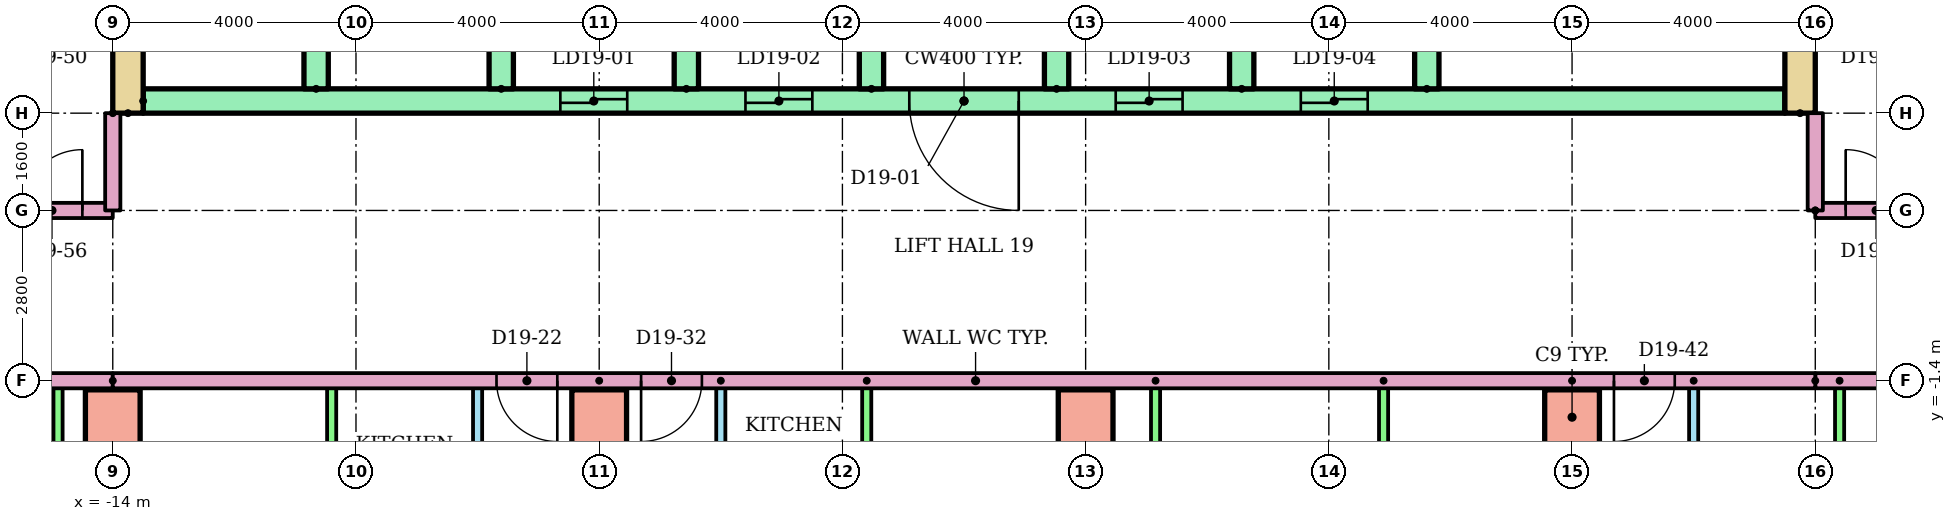
"""IFC4 building model, lengths in metres.
Left out: names, types, materials, properties, quantities, classifications, styles, units other than length and angle.
Written with IfcOpenShell. Run it as: python <this file> out.ifc"""

import sys

from ifc_helpers import new_model, si_unit, direction, frame, frame_2d, origin, origin_2d, place, context, subcontext, project, spatial, rectangle, extrude, element, fill, save


model = new_model("IFC4")
c1 = context("Model", 3, precision=1e-05, world=origin(), true_north=direction((0.0, 1.0)))
c2 = subcontext(c1, "Body", "Model", "MODEL_VIEW")
j1 = project(units=[si_unit("LENGTHUNIT", "METRE"), si_unit("PLANEANGLEUNIT", "RADIAN")], contexts=[c1])
p1 = place(None, origin())
s1 = spatial("IfcSite", under=j1, at=p1, CompositionType="ELEMENT")
p2 = place(p1, origin())
s2 = spatial("IfcBuilding", under=s1, at=p2, CompositionType="ELEMENT")
p3 = place(p2, frame((0.0, 0.0, 77.5)))
s3 = spatial("IfcBuildingStorey", under=s2, at=p3, CompositionType="ELEMENT", Elevation=77.5)
for number, where in (
    (1, (-14.0, -2.0, 0.0)),
    (2, (-6.0, -2.0, 0.0)),
    (3, (2.0, -2.0, 0.0)),
    (4, (10.0, -2.0, 0.0)),
):
    element("IfcColumn", number, at=place(p3, frame(where)), inside=s3, PredefinedType="COLUMN", context=c2, shape_type="SweptSolid", body=[
        extrude(rectangle(XDim=0.9, YDim=0.9, at=origin_2d()), origin(), (0.0, 0.0, 1.0), 3.2),
    ])
for number, where, z_axis, x_axis in (
    (5, (-13.75, 3.0, 0.0), (0.0, 0.0, 1.0), (0.0, 1.0, 0.0)),
    (6, (13.75, 3.0, 0.0), (0.0, 0.0, 1.0), (0.0, 1.0, 0.0)),
):
    element("IfcWall", number, at=place(p3, frame(where, z_axis=z_axis, x_axis=x_axis)), inside=s3, PredefinedType="SHEAR", context=c2, shape_type="SweptSolid", body=[
        extrude(rectangle(XDim=17.0, YDim=0.5, at=frame_2d((8.5, 0.0))), origin(), (0.0, 0.0, 1.0), 2.92),
    ])
p4 = place(p3, frame((-13.5, 3.2, 0.0)))
e7 = element("IfcWall", 7, at=p4, inside=s3, PredefinedType="SHEAR", context=c2, shape_type="SweptSolid", body=[
    extrude(rectangle(XDim=27.0, YDim=0.4, at=frame_2d((13.5, 0.0))), origin(), (0.0, 0.0, 1.0), 2.92),
])
p5 = place(p4, frame((6.861, 0.0, 0.0)))
e8 = element("IfcOpeningElement", 8, at=p5, cuts=e7, PredefinedType="OPENING", context=c2, shape_type="SweptSolid", body=[
    extrude(rectangle(XDim=1.1, YDim=2.1, at=frame_2d((0.55, 1.05))), frame((0.0, 0.21, 0.0), z_axis=(0.0, -1.0, 0.0), x_axis=(1.0, 0.0, 0.0)), (0.0, 0.0, 1.0), 0.42),
])
p6 = place(p4, frame((9.906, 0.0, 0.0)))
e9 = element("IfcOpeningElement", 9, at=p6, cuts=e7, PredefinedType="OPENING", context=c2, shape_type="SweptSolid", body=[
    extrude(rectangle(XDim=1.1, YDim=2.1, at=frame_2d((0.55, 1.05))), frame((0.0, 0.21, 0.0), z_axis=(0.0, -1.0, 0.0), x_axis=(1.0, 0.0, 0.0)), (0.0, 0.0, 1.0), 0.42),
])
p7 = place(p4, frame((15.994, 0.0, 0.0)))
e10 = element("IfcOpeningElement", 10, at=p7, cuts=e7, PredefinedType="OPENING", context=c2, shape_type="SweptSolid", body=[
    extrude(rectangle(XDim=1.1, YDim=2.1, at=frame_2d((0.55, 1.05))), frame((0.0, 0.21, 0.0), z_axis=(0.0, -1.0, 0.0), x_axis=(1.0, 0.0, 0.0)), (0.0, 0.0, 1.0), 0.42),
])
p8 = place(p4, frame((19.039, 0.0, 0.0)))
e11 = element("IfcOpeningElement", 11, at=p8, cuts=e7, PredefinedType="OPENING", context=c2, shape_type="SweptSolid", body=[
    extrude(rectangle(XDim=1.1, YDim=2.1, at=frame_2d((0.55, 1.05))), frame((0.0, 0.21, 0.0), z_axis=(0.0, -1.0, 0.0), x_axis=(1.0, 0.0, 0.0)), (0.0, 0.0, 1.0), 0.42),
])
p9 = place(p4, frame((12.6, 0.0, 0.0)))
e12 = element("IfcOpeningElement", 12, at=p9, cuts=e7, PredefinedType="OPENING", context=c2, shape_type="SweptSolid", body=[
    extrude(rectangle(XDim=1.8, YDim=2.1, at=frame_2d((0.9, 1.05))), frame((0.0, 0.21, 0.0), z_axis=(0.0, -1.0, 0.0), x_axis=(1.0, 0.0, 0.0)), (0.0, 0.0, 1.0), 0.42),
])
for number, where, z_axis, x_axis in (
    (13, (-10.656, 3.4, 0.0), (0.0, 0.0, 1.0), (0.0, 1.0, 0.0)),
    (14, (-7.611, 3.4, 0.0), (0.0, 0.0, 1.0), (0.0, 1.0, 0.0)),
    (15, (-4.567, 3.4, 0.0), (0.0, 0.0, 1.0), (0.0, 1.0, 0.0)),
    (16, (-1.522, 3.4, 0.0), (0.0, 0.0, 1.0), (0.0, 1.0, 0.0)),
    (17, (1.522, 3.4, 0.0), (0.0, 0.0, 1.0), (0.0, 1.0, 0.0)),
    (18, (4.567, 3.4, 0.0), (0.0, 0.0, 1.0), (0.0, 1.0, 0.0)),
    (19, (7.611, 3.4, 0.0), (0.0, 0.0, 1.0), (0.0, 1.0, 0.0)),
):
    element("IfcWall", number, at=place(p3, frame(where, z_axis=z_axis, x_axis=x_axis)), inside=s3, PredefinedType="SHEAR", context=c2, shape_type="SweptSolid", body=[
        extrude(rectangle(XDim=3.0, YDim=0.4, at=frame_2d((1.5, 0.0))), origin(), (0.0, 0.0, 1.0), 2.92),
    ])
p10 = place(p3, frame((-8.0, -7.9, 0.0), z_axis=(0.0, 0.0, 1.0), x_axis=(0.0, 1.0, 0.0)))
e20 = element("IfcWall", 20, at=p10, inside=s3, PredefinedType="PARTITIONING", context=c2, shape_type="SweptSolid", body=[
    extrude(rectangle(XDim=6.5, YDim=0.15, at=frame_2d((3.25, 0.0))), origin(), (0.0, 0.0, 1.0), 2.4),
])
p11 = place(p10, frame((4.3, 0.0, 0.0)))
e21 = element("IfcOpeningElement", 21, at=p11, cuts=e20, PredefinedType="OPENING", context=c2, shape_type="SweptSolid", body=[
    extrude(rectangle(XDim=0.9, YDim=2.1, at=frame_2d((0.45, 1.05))), frame((0.0, 0.085, 0.0), z_axis=(0.0, -1.0, 0.0), x_axis=(1.0, 0.0, 0.0)), (0.0, 0.0, 1.0), 0.17),
])
p12 = place(p10, frame((1.1, 0.0, 0.0)))
e22 = element("IfcOpeningElement", 22, at=p12, cuts=e20, PredefinedType="OPENING", context=c2, shape_type="SweptSolid", body=[
    extrude(rectangle(XDim=0.8, YDim=2.1, at=frame_2d((0.4, 1.05))), frame((0.0, 0.085, 0.0), z_axis=(0.0, -1.0, 0.0), x_axis=(1.0, 0.0, 0.0)), (0.0, 0.0, 1.0), 0.17),
])
for number, where, z_axis, x_axis in (
    (23, (-10.4, -7.9, 0.0), (0.0, 0.0, 1.0), (0.0, 1.0, 0.0)),
    (24, (-14.9, -7.9, 0.0), (0.0, 0.0, 1.0), (0.0, 1.0, 0.0)),
):
    element("IfcWall", number, at=place(p3, frame(where, z_axis=z_axis, x_axis=x_axis)), inside=s3, PredefinedType="PARTITIONING", context=c2, shape_type="SweptSolid", body=[
        extrude(rectangle(XDim=6.5, YDim=0.15, at=frame_2d((3.25, 0.0))), origin(), (0.0, 0.0, 1.0), 2.4),
    ])
p13 = place(p3, frame((-4.0, -1.4, 0.0), z_axis=(0.0, 0.0, 1.0), x_axis=(0.0, -1.0, 0.0)))
e25 = element("IfcWall", 25, at=p13, inside=s3, PredefinedType="PARTITIONING", context=c2, shape_type="SweptSolid", body=[
    extrude(rectangle(XDim=6.5, YDim=0.15, at=frame_2d((3.25, 0.0))), origin(), (0.0, 0.0, 1.0), 2.4),
])
p14 = place(p13, frame((1.3, 0.0, 0.0)))
e26 = element("IfcOpeningElement", 26, at=p14, cuts=e25, PredefinedType="OPENING", context=c2, shape_type="SweptSolid", body=[
    extrude(rectangle(XDim=0.9, YDim=2.1, at=frame_2d((0.45, 1.05))), frame((0.0, 0.085, 0.0), z_axis=(0.0, -1.0, 0.0), x_axis=(1.0, 0.0, 0.0)), (0.0, 0.0, 1.0), 0.17),
])
p15 = place(p13, frame((4.6, 0.0, 0.0)))
e27 = element("IfcOpeningElement", 27, at=p15, cuts=e25, PredefinedType="OPENING", context=c2, shape_type="SweptSolid", body=[
    extrude(rectangle(XDim=0.8, YDim=2.1, at=frame_2d((0.4, 1.05))), frame((0.0, 0.085, 0.0), z_axis=(0.0, -1.0, 0.0), x_axis=(1.0, 0.0, 0.0)), (0.0, 0.0, 1.0), 0.17),
])
for number, where, z_axis, x_axis in (
    (28, (-1.6, -1.4, 0.0), (0.0, 0.0, 1.0), (0.0, -1.0, 0.0)),
    (29, (3.15, -1.4, 0.0), (0.0, 0.0, 1.0), (0.0, -1.0, 0.0)),
    (30, (6.9, -1.4, 0.0), (0.0, 0.0, 1.0), (0.0, -1.0, 0.0)),
):
    element("IfcWall", number, at=place(p3, frame(where, z_axis=z_axis, x_axis=x_axis)), inside=s3, PredefinedType="PARTITIONING", context=c2, shape_type="SweptSolid", body=[
        extrude(rectangle(XDim=6.5, YDim=0.15, at=frame_2d((3.25, 0.0))), origin(), (0.0, 0.0, 1.0), 2.4),
    ])
p16 = place(p3, frame((-6.0, -1.4, 0.0), z_axis=(0.0, 0.0, 1.0), x_axis=(0.0, -1.0, 0.0)))
e31 = element("IfcWall", 31, at=p16, inside=s3, PredefinedType="PARTITIONING", context=c2, shape_type="SweptSolid", body=[
    extrude(rectangle(XDim=14.81, YDim=0.25, at=frame_2d((7.405, 0.0))), origin(), (0.0, 0.0, 1.0), 2.4),
])
p17 = place(p3, frame((12.0, -1.4, 0.0), z_axis=(0.0, 0.0, 1.0), x_axis=(0.0, -1.0, 0.0)))
e32 = element("IfcWall", 32, at=p17, inside=s3, PredefinedType="PARTITIONING", context=c2, shape_type="SweptSolid", body=[
    extrude(rectangle(XDim=6.5, YDim=0.15, at=frame_2d((3.25, 0.0))), origin(), (0.0, 0.0, 1.0), 2.4),
])
p18 = place(p17, frame((1.3, 0.0, 0.0)))
e33 = element("IfcOpeningElement", 33, at=p18, cuts=e32, PredefinedType="OPENING", context=c2, shape_type="SweptSolid", body=[
    extrude(rectangle(XDim=0.9, YDim=2.1, at=frame_2d((0.45, 1.05))), frame((0.0, 0.085, 0.0), z_axis=(0.0, -1.0, 0.0), x_axis=(1.0, 0.0, 0.0)), (0.0, 0.0, 1.0), 0.17),
])
p19 = place(p17, frame((4.6, 0.0, 0.0)))
e34 = element("IfcOpeningElement", 34, at=p19, cuts=e32, PredefinedType="OPENING", context=c2, shape_type="SweptSolid", body=[
    extrude(rectangle(XDim=0.8, YDim=2.1, at=frame_2d((0.4, 1.05))), frame((0.0, 0.085, 0.0), z_axis=(0.0, -1.0, 0.0), x_axis=(1.0, 0.0, 0.0)), (0.0, 0.0, 1.0), 0.17),
])
p20 = place(p3, frame((14.4, -1.4, 0.0), z_axis=(0.0, 0.0, 1.0), x_axis=(0.0, -1.0, 0.0)))
e35 = element("IfcWall", 35, at=p20, inside=s3, PredefinedType="PARTITIONING", context=c2, shape_type="SweptSolid", body=[
    extrude(rectangle(XDim=6.5, YDim=0.15, at=frame_2d((3.25, 0.0))), origin(), (0.0, 0.0, 1.0), 2.4),
])
p21 = place(p3, frame((10.0, -1.4, 0.0), z_axis=(0.0, 0.0, 1.0), x_axis=(0.0, -1.0, 0.0)))
e36 = element("IfcWall", 36, at=p21, inside=s3, PredefinedType="PARTITIONING", context=c2, shape_type="SweptSolid", body=[
    extrude(rectangle(XDim=14.81, YDim=0.25, at=frame_2d((7.405, 0.0))), origin(), (0.0, 0.0, 1.0), 2.4),
])
p22 = place(p3, frame((-14.0, -1.4, 0.0), z_axis=(0.0, 0.0, 1.0), x_axis=(-1.0, 0.0, 0.0)))
e37 = element("IfcWall", 37, at=p22, inside=s3, PredefinedType="PARTITIONING", context=c2, shape_type="SweptSolid", body=[
    extrude(rectangle(XDim=14.62, YDim=0.25, at=frame_2d((7.31, 0.0))), origin(), (0.0, 0.0, 1.0), 2.4),
])
p23 = place(p3, frame((29.0, -1.4, 0.0), z_axis=(0.0, 0.0, 1.0), x_axis=(-1.0, 0.0, 0.0)))
e38 = element("IfcWall", 38, at=p23, inside=s3, PredefinedType="PARTITIONING", context=c2, shape_type="SweptSolid", body=[
    extrude(rectangle(XDim=15.0, YDim=0.25, at=frame_2d((7.5, 0.0))), origin(), (0.0, 0.0, 1.0), 2.4),
])
p24 = place(p23, frame((1.311, 0.0, 0.0)))
e39 = element("IfcOpeningElement", 39, at=p24, cuts=e38, PredefinedType="OPENING", context=c2, shape_type="SweptSolid", body=[
    extrude(rectangle(XDim=1.0, YDim=2.1, at=frame_2d((0.5, 1.05))), frame((0.0, 0.135, 0.0), z_axis=(0.0, -1.0, 0.0), x_axis=(1.0, 0.0, 0.0)), (0.0, 0.0, 1.0), 0.27),
])
p25 = place(p3, frame((-28.62, 1.4, 0.0)))
e40 = element("IfcWall", 40, at=p25, inside=s3, PredefinedType="PARTITIONING", context=c2, shape_type="SweptSolid", body=[
    extrude(rectangle(XDim=14.62, YDim=0.25, at=frame_2d((7.31, 0.0))), origin(), (0.0, 0.0, 1.0), 2.4),
])
p26 = place(p25, frame((13.12, 0.0, 0.0)))
e41 = element("IfcOpeningElement", 41, at=p26, cuts=e40, PredefinedType="OPENING", context=c2, shape_type="SweptSolid", body=[
    extrude(rectangle(XDim=1.0, YDim=2.1, at=frame_2d((0.5, 1.05))), frame((0.0, 0.135, 0.0), z_axis=(0.0, -1.0, 0.0), x_axis=(1.0, 0.0, 0.0)), (0.0, 0.0, 1.0), 0.27),
])
p27 = place(p3, frame((14.0, 1.4, 0.0)))
e42 = element("IfcWall", 42, at=p27, inside=s3, PredefinedType="PARTITIONING", context=c2, shape_type="SweptSolid", body=[
    extrude(rectangle(XDim=15.0, YDim=0.25, at=frame_2d((7.5, 0.0))), origin(), (0.0, 0.0, 1.0), 2.4),
])
p28 = place(p27, frame((0.5, 0.0, 0.0)))
e43 = element("IfcOpeningElement", 43, at=p28, cuts=e42, PredefinedType="OPENING", context=c2, shape_type="SweptSolid", body=[
    extrude(rectangle(XDim=1.0, YDim=2.1, at=frame_2d((0.5, 1.05))), frame((0.0, 0.135, 0.0), z_axis=(0.0, -1.0, 0.0), x_axis=(1.0, 0.0, 0.0)), (0.0, 0.0, 1.0), 0.27),
])
p29 = place(p27, frame((12.689, 0.0, 0.0)))
e44 = element("IfcOpeningElement", 44, at=p29, cuts=e42, PredefinedType="OPENING", context=c2, shape_type="SweptSolid", body=[
    extrude(rectangle(XDim=1.0, YDim=2.1, at=frame_2d((0.5, 1.05))), frame((0.0, 0.135, 0.0), z_axis=(0.0, -1.0, 0.0), x_axis=(1.0, 0.0, 0.0)), (0.0, 0.0, 1.0), 0.27),
])
p30 = place(p3, frame((14.0, -1.4, 0.0), z_axis=(0.0, 0.0, 1.0), x_axis=(-1.0, 0.0, 0.0)))
e45 = element("IfcWall", 45, at=p30, inside=s3, PredefinedType="PARTITIONING", context=c2, shape_type="SweptSolid", body=[
    extrude(rectangle(XDim=28.0, YDim=0.25, at=frame_2d((14.0, 0.0))), origin(), (0.0, 0.0, 1.0), 2.4),
])
p31 = place(p30, frame((20.689, 0.0, 0.0)))
e46 = element("IfcOpeningElement", 46, at=p31, cuts=e45, PredefinedType="OPENING", context=c2, shape_type="SweptSolid", body=[
    extrude(rectangle(XDim=1.0, YDim=2.1, at=frame_2d((0.5, 1.05))), frame((0.0, 0.135, 0.0), z_axis=(0.0, -1.0, 0.0), x_axis=(1.0, 0.0, 0.0)), (0.0, 0.0, 1.0), 0.27),
])
p32 = place(p30, frame((18.311, 0.0, 0.0)))
e47 = element("IfcOpeningElement", 47, at=p32, cuts=e45, PredefinedType="OPENING", context=c2, shape_type="SweptSolid", body=[
    extrude(rectangle(XDim=1.0, YDim=2.1, at=frame_2d((0.5, 1.05))), frame((0.0, 0.135, 0.0), z_axis=(0.0, -1.0, 0.0), x_axis=(1.0, 0.0, 0.0)), (0.0, 0.0, 1.0), 0.27),
])
p33 = place(p30, frame((2.311, 0.0, 0.0)))
e48 = element("IfcOpeningElement", 48, at=p33, cuts=e45, PredefinedType="OPENING", context=c2, shape_type="SweptSolid", body=[
    extrude(rectangle(XDim=1.0, YDim=2.1, at=frame_2d((0.5, 1.05))), frame((0.0, 0.135, 0.0), z_axis=(0.0, -1.0, 0.0), x_axis=(1.0, 0.0, 0.0)), (0.0, 0.0, 1.0), 0.27),
])
for number, where, z_axis, x_axis in (
    (49, (-14.0, 3.0, 0.0), (0.0, 0.0, 1.0), (0.0, -1.0, 0.0)),
    (50, (14.0, 1.4, 0.0), (0.0, 0.0, 1.0), (0.0, 1.0, 0.0)),
):
    element("IfcWall", number, at=place(p3, frame(where, z_axis=z_axis, x_axis=x_axis)), inside=s3, PredefinedType="PARTITIONING", context=c2, shape_type="SweptSolid", body=[
        extrude(rectangle(XDim=1.6, YDim=0.25, at=frame_2d((0.8, 0.0))), origin(), (0.0, 0.0, 1.0), 2.4),
    ])
p34 = place(p5, origin())
e51 = element("IfcDoor", 51, at=p34, inside=s3, OperationType="SLIDING_TO_LEFT", PredefinedType="DOOR", context=c2, shape_type="SweptSolid", body=[
    extrude(rectangle(XDim=1.1, YDim=2.1, at=frame_2d((0.55, 1.05))), frame((0.0, 0.025, 0.0), z_axis=(0.0, -1.0, 0.0), x_axis=(1.0, 0.0, 0.0)), (0.0, 0.0, 1.0), 0.05),
])
fill(e8, e51)
p35 = place(p6, origin())
e52 = element("IfcDoor", 52, at=p35, inside=s3, OperationType="SLIDING_TO_LEFT", PredefinedType="DOOR", context=c2, shape_type="SweptSolid", body=[
    extrude(rectangle(XDim=1.1, YDim=2.1, at=frame_2d((0.55, 1.05))), frame((0.0, 0.025, 0.0), z_axis=(0.0, -1.0, 0.0), x_axis=(1.0, 0.0, 0.0)), (0.0, 0.0, 1.0), 0.05),
])
fill(e9, e52)
p36 = place(p7, origin())
e53 = element("IfcDoor", 53, at=p36, inside=s3, OperationType="SLIDING_TO_LEFT", PredefinedType="DOOR", context=c2, shape_type="SweptSolid", body=[
    extrude(rectangle(XDim=1.1, YDim=2.1, at=frame_2d((0.55, 1.05))), frame((0.0, 0.025, 0.0), z_axis=(0.0, -1.0, 0.0), x_axis=(1.0, 0.0, 0.0)), (0.0, 0.0, 1.0), 0.05),
])
fill(e10, e53)
p37 = place(p8, origin())
e54 = element("IfcDoor", 54, at=p37, inside=s3, OperationType="SLIDING_TO_LEFT", PredefinedType="DOOR", context=c2, shape_type="SweptSolid", body=[
    extrude(rectangle(XDim=1.1, YDim=2.1, at=frame_2d((0.55, 1.05))), frame((0.0, 0.025, 0.0), z_axis=(0.0, -1.0, 0.0), x_axis=(1.0, 0.0, 0.0)), (0.0, 0.0, 1.0), 0.05),
])
fill(e11, e54)
p38 = place(p9, frame((1.8, 0.0, 0.0), z_axis=(0.0, 0.0, 1.0), x_axis=(-1.0, 0.0, 0.0)))
e55 = element("IfcDoor", 55, at=p38, inside=s3, OperationType="DOUBLE_DOOR_SINGLE_SWING", PredefinedType="DOOR", context=c2, shape_type="SweptSolid", body=[
    extrude(rectangle(XDim=1.8, YDim=2.1, at=frame_2d((0.9, 1.05))), frame((0.0, 0.025, 0.0), z_axis=(0.0, -1.0, 0.0), x_axis=(1.0, 0.0, 0.0)), (0.0, 0.0, 1.0), 0.05),
])
fill(e12, e55)
p39 = place(p31, origin())
e56 = element("IfcDoor", 56, at=p39, inside=s3, OperationType="SINGLE_SWING_LEFT", PredefinedType="DOOR", context=c2, shape_type="SweptSolid", body=[
    extrude(rectangle(XDim=1.0, YDim=2.1, at=frame_2d((0.5, 1.05))), frame((0.0, 0.025, 0.0), z_axis=(0.0, -1.0, 0.0), x_axis=(1.0, 0.0, 0.0)), (0.0, 0.0, 1.0), 0.05),
])
fill(e46, e56)
p40 = place(p32, origin())
e57 = element("IfcDoor", 57, at=p40, inside=s3, OperationType="SINGLE_SWING_RIGHT", PredefinedType="DOOR", context=c2, shape_type="SweptSolid", body=[
    extrude(rectangle(XDim=1.0, YDim=2.1, at=frame_2d((0.5, 1.05))), frame((0.0, 0.025, 0.0), z_axis=(0.0, -1.0, 0.0), x_axis=(1.0, 0.0, 0.0)), (0.0, 0.0, 1.0), 0.05),
])
fill(e47, e57)
p41 = place(p33, origin())
e58 = element("IfcDoor", 58, at=p41, inside=s3, OperationType="SINGLE_SWING_RIGHT", PredefinedType="DOOR", context=c2, shape_type="SweptSolid", body=[
    extrude(rectangle(XDim=1.0, YDim=2.1, at=frame_2d((0.5, 1.05))), frame((0.0, 0.025, 0.0), z_axis=(0.0, -1.0, 0.0), x_axis=(1.0, 0.0, 0.0)), (0.0, 0.0, 1.0), 0.05),
])
fill(e48, e58)
p42 = place(p26, origin())
e59 = element("IfcDoor", 59, at=p42, inside=s3, OperationType="SINGLE_SWING_RIGHT", PredefinedType="DOOR", context=c2, shape_type="SweptSolid", body=[
    extrude(rectangle(XDim=1.0, YDim=2.1, at=frame_2d((0.5, 1.05))), frame((0.0, 0.025, 0.0), z_axis=(0.0, -1.0, 0.0), x_axis=(1.0, 0.0, 0.0)), (0.0, 0.0, 1.0), 0.05),
])
fill(e41, e59)
p43 = place(p28, origin())
e60 = element("IfcDoor", 60, at=p43, inside=s3, OperationType="SINGLE_SWING_LEFT", PredefinedType="DOOR", context=c2, shape_type="SweptSolid", body=[
    extrude(rectangle(XDim=1.0, YDim=2.1, at=frame_2d((0.5, 1.05))), frame((0.0, 0.025, 0.0), z_axis=(0.0, -1.0, 0.0), x_axis=(1.0, 0.0, 0.0)), (0.0, 0.0, 1.0), 0.05),
])
fill(e43, e60)
save(model, sys.argv[1])
